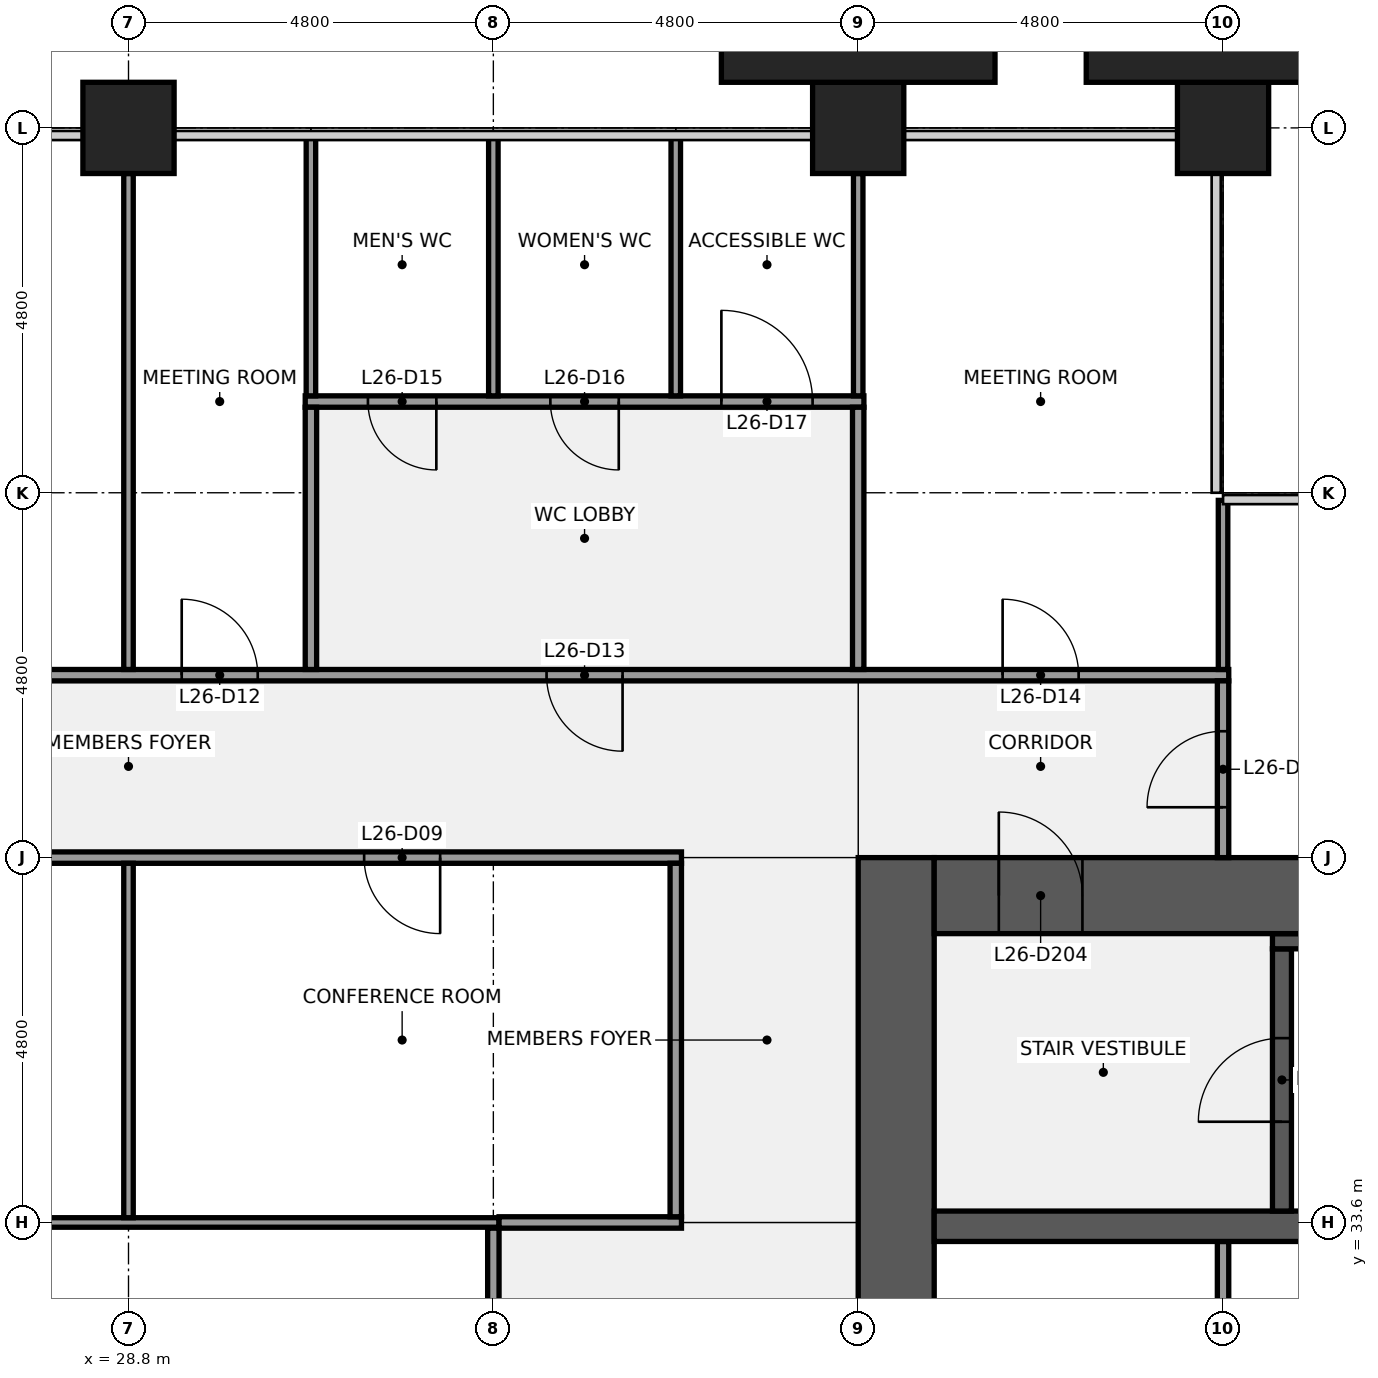
"""IFC4 building model, lengths in metres.
Left out: names, types, materials, properties, quantities, classifications, styles, units other than length and angle.
Written with IfcOpenShell. Run it as: python <this file> out.ifc"""

import sys

from ifc_helpers import new_model, si_unit, direction, frame, frame_2d, origin, origin_2d, place, context, subcontext, project, spatial, rectangle, extrude, element, fill, save


model = new_model("IFC4")
c1 = context("Model", 3, precision=1e-05, world=origin(), true_north=direction((0.0, 1.0)))
c2 = subcontext(c1, "Body", "Model", "MODEL_VIEW")
j1 = project(units=[si_unit("LENGTHUNIT", "METRE"), si_unit("PLANEANGLEUNIT", "RADIAN")], contexts=[c1])
p1 = place(None, origin())
s1 = spatial("IfcSite", under=j1, at=p1, CompositionType="ELEMENT")
p2 = place(p1, origin())
s2 = spatial("IfcBuilding", under=s1, at=p2, CompositionType="ELEMENT")
p3 = place(p2, frame((0.0, 0.0, 124.1)))
s3 = spatial("IfcBuildingStorey", under=s2, at=p3, CompositionType="ELEMENT", Elevation=124.1)
for number, where, z_axis, x_axis in (
    (1, (28.8, 48.0, 0.0), (0.0, 0.0, 1.0), (1.0, 0.0, 0.0)),
    (2, (38.4, 48.0, 0.0), (0.0, 0.0, 1.0), (1.0, 0.0, 0.0)),
    (3, (43.2, 48.0, 0.0), (0.0, 0.0, 1.0), (1.0, 0.0, 0.0)),
):
    element("IfcColumn", number, at=place(p3, frame(where, z_axis=z_axis, x_axis=x_axis)), inside=s3, PredefinedType="COLUMN", context=c2, shape_type="SweptSolid", body=[
        extrude(rectangle(XDim=1.2, YDim=1.2, at=origin_2d()), origin(), (0.0, 0.0, 1.0), 4.0),
    ])
p4 = place(p3, frame((38.9, 9.6, 0.0), z_axis=(0.0, 0.0, 1.0), x_axis=(0.0, 1.0, 0.0)))
e4 = element("IfcWall", 4, at=p4, inside=s3, PredefinedType="SHEAR", context=c2, shape_type="SweptSolid", body=[
    extrude(rectangle(XDim=28.8, YDim=1.0, at=frame_2d((14.4, 0.0))), origin(), (0.0, 0.0, 1.0), 3.84),
])
p5 = place(p4, frame((8.7, 0.0, 0.0)))
e5 = element("IfcOpeningElement", 5, at=p5, cuts=e4, PredefinedType="OPENING", context=c2, shape_type="SweptSolid", body=[
    extrude(rectangle(XDim=1.8, YDim=2.1, at=frame_2d((0.9, 1.05))), frame((0.0, 0.51, 0.0), z_axis=(0.0, -1.0, 0.0), x_axis=(1.0, 0.0, 0.0)), (0.0, 0.0, 1.0), 1.02),
])
p6 = place(p4, frame((18.3, 0.0, 0.0)))
e6 = element("IfcOpeningElement", 6, at=p6, cuts=e4, PredefinedType="OPENING", context=c2, shape_type="SweptSolid", body=[
    extrude(rectangle(XDim=1.8, YDim=2.1, at=frame_2d((0.9, 1.05))), frame((0.0, 0.51, 0.0), z_axis=(0.0, -1.0, 0.0), x_axis=(1.0, 0.0, 0.0)), (0.0, 0.0, 1.0), 1.02),
])
p7 = place(p3, frame((43.2, 30.75, 0.0), z_axis=(0.0, 0.0, 1.0), x_axis=(0.0, 1.0, 0.0)))
e7 = element("IfcWall", 7, at=p7, inside=s3, PredefinedType="PARTITIONING", context=c2, shape_type="SweptSolid", body=[
    extrude(rectangle(XDim=2.6, YDim=0.15, at=frame_2d((1.3, 0.0))), origin(), (0.0, 0.0, 1.0), 3.84),
])
p8 = place(p3, frame((39.4, 33.55, 0.0), z_axis=(0.0, 0.0, 1.0), x_axis=(1.0, 0.0, 0.0)))
e8 = element("IfcWall", 8, at=p8, inside=s3, PredefinedType="SHEAR", context=c2, shape_type="SweptSolid", body=[
    extrude(rectangle(XDim=17.2, YDim=0.4, at=frame_2d((8.6, 0.0))), origin(), (0.0, 0.0, 1.0), 3.84),
])
p9 = place(p3, frame((43.975, 33.75, 0.0), z_axis=(0.0, 0.0, 1.0), x_axis=(0.0, 1.0, 0.0)))
e9 = element("IfcWall", 9, at=p9, inside=s3, PredefinedType="SHEAR", context=c2, shape_type="SweptSolid", body=[
    extrude(rectangle(XDim=3.45, YDim=0.25, at=frame_2d((1.725, 0.0))), origin(), (0.0, 0.0, 1.0), 3.84),
])
p10 = place(p9, frame((1.175, 0.0, 0.0)))
e10 = element("IfcOpeningElement", 10, at=p10, cuts=e9, PredefinedType="OPENING", context=c2, shape_type="SweptSolid", body=[
    extrude(rectangle(XDim=1.1, YDim=2.1, at=frame_2d((0.55, 1.05))), frame((0.0, 0.135, 0.0), z_axis=(0.0, -1.0, 0.0), x_axis=(1.0, 0.0, 0.0)), (0.0, 0.0, 1.0), 0.27),
])
p11 = place(p3, frame((43.85, 37.3, 0.0), z_axis=(0.0, 0.0, 1.0), x_axis=(1.0, 0.0, 0.0)))
e11 = element("IfcWall", 11, at=p11, inside=s3, PredefinedType="SHEAR", context=c2, shape_type="SweptSolid", body=[
    extrude(rectangle(XDim=7.5, YDim=0.2, at=frame_2d((3.75, 0.0))), origin(), (0.0, 0.0, 1.0), 3.84),
])
p12 = place(p3, frame((39.4, 37.9, 0.0), z_axis=(0.0, 0.0, 1.0), x_axis=(1.0, 0.0, 0.0)))
e12 = element("IfcWall", 12, at=p12, inside=s3, PredefinedType="SHEAR", context=c2, shape_type="SweptSolid", body=[
    extrude(rectangle(XDim=13.4, YDim=1.0, at=frame_2d((6.7, 0.0))), origin(), (0.0, 0.0, 1.0), 3.84),
])
p13 = place(p12, frame((0.85, 0.0, 0.0)))
e13 = element("IfcOpeningElement", 13, at=p13, cuts=e12, PredefinedType="OPENING", context=c2, shape_type="SweptSolid", body=[
    extrude(rectangle(XDim=1.1, YDim=2.1, at=frame_2d((0.55, 1.05))), frame((0.0, 0.51, 0.0), z_axis=(0.0, -1.0, 0.0), x_axis=(1.0, 0.0, 0.0)), (0.0, 0.0, 1.0), 1.02),
])
p14 = place(p3, frame((24.075, 33.6, 0.0), z_axis=(0.0, 0.0, 1.0), x_axis=(1.0, 0.0, 0.0)))
e14 = element("IfcWall", 14, at=p14, inside=s3, PredefinedType="PARTITIONING", context=c2, shape_type="SweptSolid", body=[
    extrude(rectangle(XDim=9.6, YDim=0.125, at=frame_2d((4.8, 0.0))), origin(), (0.0, 0.0, 1.0), 2.849),
])
p15 = place(p3, frame((33.675, 33.6, 0.0), z_axis=(0.0, 0.0, 1.0), x_axis=(1.0, 0.0, 0.0)))
e15 = element("IfcWall", 15, at=p15, inside=s3, PredefinedType="PARTITIONING", context=c2, shape_type="SweptSolid", body=[
    extrude(rectangle(XDim=2.4, YDim=0.15, at=frame_2d((1.2, 0.0))), origin(), (0.0, 0.0, 1.0), 2.849),
])
p16 = place(p3, frame((21.525, 38.4, 0.0), z_axis=(0.0, 0.0, 1.0), x_axis=(1.0, 0.0, 0.0)))
e16 = element("IfcWall", 16, at=p16, inside=s3, PredefinedType="PARTITIONING", context=c2, shape_type="SweptSolid", body=[
    extrude(rectangle(XDim=14.55, YDim=0.15, at=frame_2d((7.275, 0.0))), origin(), (0.0, 0.0, 1.0), 2.849),
])
p17 = place(p16, frame((3.175, 0.0, 0.0)))
e17 = element("IfcOpeningElement", 17, at=p17, cuts=e16, PredefinedType="OPENING", context=c2, shape_type="SweptSolid", body=[
    extrude(rectangle(XDim=1.0, YDim=2.1, at=frame_2d((0.5, 1.05))), frame((0.0, 0.085, 0.0), z_axis=(0.0, -1.0, 0.0), x_axis=(1.0, 0.0, 0.0)), (0.0, 0.0, 1.0), 0.17),
])
p18 = place(p16, frame((10.375, 0.0, 0.0)))
e18 = element("IfcOpeningElement", 18, at=p18, cuts=e16, PredefinedType="OPENING", context=c2, shape_type="SweptSolid", body=[
    extrude(rectangle(XDim=1.0, YDim=2.1, at=frame_2d((0.5, 1.05))), frame((0.0, 0.085, 0.0), z_axis=(0.0, -1.0, 0.0), x_axis=(1.0, 0.0, 0.0)), (0.0, 0.0, 1.0), 0.17),
])
p19 = place(p3, frame((14.325, 40.8, 0.0), z_axis=(0.0, 0.0, 1.0), x_axis=(1.0, 0.0, 0.0)))
e19 = element("IfcWall", 19, at=p19, inside=s3, PredefinedType="PARTITIONING", context=c2, shape_type="SweptSolid", body=[
    extrude(rectangle(XDim=28.95, YDim=0.15, at=frame_2d((14.475, 0.0))), origin(), (0.0, 0.0, 1.0), 2.849),
])
p20 = place(p19, frame((1.975, 0.0, 0.0)))
e20 = element("IfcOpeningElement", 20, at=p20, cuts=e19, PredefinedType="OPENING", context=c2, shape_type="SweptSolid", body=[
    extrude(rectangle(XDim=1.0, YDim=2.1, at=frame_2d((0.5, 1.05))), frame((0.0, 0.085, 0.0), z_axis=(0.0, -1.0, 0.0), x_axis=(1.0, 0.0, 0.0)), (0.0, 0.0, 1.0), 0.17),
])
p21 = place(p19, frame((9.175, 0.0, 0.0)))
e21 = element("IfcOpeningElement", 21, at=p21, cuts=e19, PredefinedType="OPENING", context=c2, shape_type="SweptSolid", body=[
    extrude(rectangle(XDim=1.0, YDim=2.1, at=frame_2d((0.5, 1.05))), frame((0.0, 0.085, 0.0), z_axis=(0.0, -1.0, 0.0), x_axis=(1.0, 0.0, 0.0)), (0.0, 0.0, 1.0), 0.17),
])
p22 = place(p19, frame((15.175, 0.0, 0.0)))
e22 = element("IfcOpeningElement", 22, at=p22, cuts=e19, PredefinedType="OPENING", context=c2, shape_type="SweptSolid", body=[
    extrude(rectangle(XDim=1.0, YDim=2.1, at=frame_2d((0.5, 1.05))), frame((0.0, 0.085, 0.0), z_axis=(0.0, -1.0, 0.0), x_axis=(1.0, 0.0, 0.0)), (0.0, 0.0, 1.0), 0.17),
])
p23 = place(p19, frame((19.975, 0.0, 0.0)))
e23 = element("IfcOpeningElement", 23, at=p23, cuts=e19, PredefinedType="OPENING", context=c2, shape_type="SweptSolid", body=[
    extrude(rectangle(XDim=1.0, YDim=2.1, at=frame_2d((0.5, 1.05))), frame((0.0, 0.085, 0.0), z_axis=(0.0, -1.0, 0.0), x_axis=(1.0, 0.0, 0.0)), (0.0, 0.0, 1.0), 0.17),
])
p24 = place(p19, frame((25.975, 0.0, 0.0)))
e24 = element("IfcOpeningElement", 24, at=p24, cuts=e19, PredefinedType="OPENING", context=c2, shape_type="SweptSolid", body=[
    extrude(rectangle(XDim=1.0, YDim=2.1, at=frame_2d((0.5, 1.05))), frame((0.0, 0.085, 0.0), z_axis=(0.0, -1.0, 0.0), x_axis=(1.0, 0.0, 0.0)), (0.0, 0.0, 1.0), 0.17),
])
p25 = place(p3, frame((31.125, 44.4, 0.0), z_axis=(0.0, 0.0, 1.0), x_axis=(1.0, 0.0, 0.0)))
e25 = element("IfcWall", 25, at=p25, inside=s3, PredefinedType="PARTITIONING", context=c2, shape_type="SweptSolid", body=[
    extrude(rectangle(XDim=7.35, YDim=0.15, at=frame_2d((3.675, 0.0))), origin(), (0.0, 0.0, 1.0), 2.849),
])
p26 = place(p25, frame((0.825, 0.0, 0.0)))
e26 = element("IfcOpeningElement", 26, at=p26, cuts=e25, PredefinedType="OPENING", context=c2, shape_type="SweptSolid", body=[
    extrude(rectangle(XDim=0.9, YDim=2.1, at=frame_2d((0.45, 1.05))), frame((0.0, 0.085, 0.0), z_axis=(0.0, -1.0, 0.0), x_axis=(1.0, 0.0, 0.0)), (0.0, 0.0, 1.0), 0.17),
])
p27 = place(p25, frame((3.225, 0.0, 0.0)))
e27 = element("IfcOpeningElement", 27, at=p27, cuts=e25, PredefinedType="OPENING", context=c2, shape_type="SweptSolid", body=[
    extrude(rectangle(XDim=0.9, YDim=2.1, at=frame_2d((0.45, 1.05))), frame((0.0, 0.085, 0.0), z_axis=(0.0, -1.0, 0.0), x_axis=(1.0, 0.0, 0.0)), (0.0, 0.0, 1.0), 0.17),
])
p28 = place(p25, frame((5.475, 0.0, 0.0)))
e28 = element("IfcOpeningElement", 28, at=p28, cuts=e25, PredefinedType="OPENING", context=c2, shape_type="SweptSolid", body=[
    extrude(rectangle(XDim=1.2, YDim=2.1, at=frame_2d((0.6, 1.05))), frame((0.0, 0.085, 0.0), z_axis=(0.0, -1.0, 0.0), x_axis=(1.0, 0.0, 0.0)), (0.0, 0.0, 1.0), 0.17),
])
p29 = place(p3, frame((28.8, 33.663, 0.0), z_axis=(0.0, 0.0, 1.0), x_axis=(0.0, 1.0, 0.0)))
e29 = element("IfcWall", 29, at=p29, inside=s3, PredefinedType="PARTITIONING", context=c2, shape_type="SweptSolid", body=[
    extrude(rectangle(XDim=4.662, YDim=0.125, at=frame_2d((2.331, 0.0))), origin(), (0.0, 0.0, 1.0), 2.849),
])
p30 = place(p3, frame((28.8, 40.875, 0.0), z_axis=(0.0, 0.0, 1.0), x_axis=(0.0, 1.0, 0.0)))
e30 = element("IfcWall", 30, at=p30, inside=s3, PredefinedType="PARTITIONING", context=c2, shape_type="SweptSolid", body=[
    extrude(rectangle(XDim=6.525, YDim=0.125, at=frame_2d((3.262, 0.0))), origin(), (0.0, 0.0, 1.0), 2.849),
])
p31 = place(p3, frame((31.2, 44.475, 0.0), z_axis=(0.0, 0.0, 1.0), x_axis=(0.0, 1.0, 0.0)))
e31 = element("IfcWall", 31, at=p31, inside=s3, PredefinedType="PARTITIONING", context=c2, shape_type="SweptSolid", body=[
    extrude(rectangle(XDim=3.425, YDim=0.125, at=frame_2d((1.712, 0.0))), origin(), (0.0, 0.0, 1.0), 2.849),
])
p32 = place(p3, frame((31.2, 40.875, 0.0), z_axis=(0.0, 0.0, 1.0), x_axis=(0.0, 1.0, 0.0)))
e32 = element("IfcWall", 32, at=p32, inside=s3, PredefinedType="PARTITIONING", context=c2, shape_type="SweptSolid", body=[
    extrude(rectangle(XDim=3.45, YDim=0.15, at=frame_2d((1.725, 0.0))), origin(), (0.0, 0.0, 1.0), 2.849),
])
p33 = place(p3, frame((33.6, 44.475, 0.0), z_axis=(0.0, 0.0, 1.0), x_axis=(0.0, 1.0, 0.0)))
e33 = element("IfcWall", 33, at=p33, inside=s3, PredefinedType="PARTITIONING", context=c2, shape_type="SweptSolid", body=[
    extrude(rectangle(XDim=3.425, YDim=0.125, at=frame_2d((1.712, 0.0))), origin(), (0.0, 0.0, 1.0), 2.849),
])
p34 = place(p3, frame((33.6, 26.475, 0.0), z_axis=(0.0, 0.0, 1.0), x_axis=(0.0, 1.0, 0.0)))
e34 = element("IfcWall", 34, at=p34, inside=s3, PredefinedType="PARTITIONING", context=c2, shape_type="SweptSolid", body=[
    extrude(rectangle(XDim=7.05, YDim=0.15, at=frame_2d((3.525, 0.0))), origin(), (0.0, 0.0, 1.0), 2.849),
])
p35 = place(p3, frame((36.0, 44.475, 0.0), z_axis=(0.0, 0.0, 1.0), x_axis=(0.0, 1.0, 0.0)))
e35 = element("IfcWall", 35, at=p35, inside=s3, PredefinedType="PARTITIONING", context=c2, shape_type="SweptSolid", body=[
    extrude(rectangle(XDim=3.425, YDim=0.125, at=frame_2d((1.712, 0.0))), origin(), (0.0, 0.0, 1.0), 2.849),
])
p36 = place(p3, frame((36.0, 33.675, 0.0), z_axis=(0.0, 0.0, 1.0), x_axis=(0.0, 1.0, 0.0)))
e36 = element("IfcWall", 36, at=p36, inside=s3, PredefinedType="PARTITIONING", context=c2, shape_type="SweptSolid", body=[
    extrude(rectangle(XDim=4.65, YDim=0.15, at=frame_2d((2.325, 0.0))), origin(), (0.0, 0.0, 1.0), 2.849),
])
p37 = place(p3, frame((38.4, 44.475, 0.0), z_axis=(0.0, 0.0, 1.0), x_axis=(0.0, 1.0, 0.0)))
e37 = element("IfcWall", 37, at=p37, inside=s3, PredefinedType="PARTITIONING", context=c2, shape_type="SweptSolid", body=[
    extrude(rectangle(XDim=2.925, YDim=0.125, at=frame_2d((1.462, 0.0))), origin(), (0.0, 0.0, 1.0), 2.849),
])
p38 = place(p3, frame((38.4, 40.875, 0.0), z_axis=(0.0, 0.0, 1.0), x_axis=(0.0, 1.0, 0.0)))
e38 = element("IfcWall", 38, at=p38, inside=s3, PredefinedType="PARTITIONING", context=c2, shape_type="SweptSolid", body=[
    extrude(rectangle(XDim=3.45, YDim=0.15, at=frame_2d((1.725, 0.0))), origin(), (0.0, 0.0, 1.0), 2.849),
])
p39 = place(p3, frame((43.2, 40.875, 0.0), z_axis=(0.0, 0.0, 1.0), x_axis=(0.0, 1.0, 0.0)))
e39 = element("IfcWall", 39, at=p39, inside=s3, PredefinedType="PARTITIONING", context=c2, shape_type="SweptSolid", body=[
    extrude(rectangle(XDim=2.225, YDim=0.125, at=frame_2d((1.113, 0.0))), origin(), (0.0, 0.0, 1.0), 2.849),
])
p40 = place(p3, frame((43.2, 38.4, 0.0), z_axis=(0.0, 0.0, 1.0), x_axis=(0.0, 1.0, 0.0)))
e40 = element("IfcWall", 40, at=p40, inside=s3, PredefinedType="PARTITIONING", context=c2, shape_type="SweptSolid", body=[
    extrude(rectangle(XDim=2.325, YDim=0.15, at=frame_2d((1.163, 0.0))), origin(), (0.0, 0.0, 1.0), 2.849),
])
p41 = place(p40, frame((0.663, 0.0, 0.0)))
e41 = element("IfcOpeningElement", 41, at=p41, cuts=e40, PredefinedType="OPENING", context=c2, shape_type="SweptSolid", body=[
    extrude(rectangle(XDim=1.0, YDim=2.1, at=frame_2d((0.5, 1.05))), frame((0.0, 0.085, 0.0), z_axis=(0.0, -1.0, 0.0), x_axis=(1.0, 0.0, 0.0)), (0.0, 0.0, 1.0), 0.17),
])
for number, where, z_axis, x_axis in (
    (42, (38.4, 49.05, 0.0), (0.0, 0.0, 1.0), (1.0, 0.0, 0.0)),
    (43, (43.2, 49.05, 0.0), (0.0, 0.0, 1.0), (1.0, 0.0, 0.0)),
):
    element("IfcColumn", number, at=place(p3, frame(where, z_axis=z_axis, x_axis=x_axis)), inside=s3, PredefinedType="PILASTER", context=c2, shape_type="SweptSolid", body=[
        extrude(rectangle(XDim=3.6, YDim=0.9, at=origin_2d()), origin(), (0.0, 0.0, 1.0), 4.0),
    ])
p42 = place(p10, origin())
e44 = element("IfcDoor", 44, at=p42, inside=s3, OperationType="SINGLE_SWING_LEFT", PredefinedType="DOOR", context=c2, shape_type="SweptSolid", body=[
    extrude(rectangle(XDim=1.1, YDim=2.1, at=frame_2d((0.55, 1.05))), frame((0.0, 0.025, 0.0), z_axis=(0.0, -1.0, 0.0), x_axis=(1.0, 0.0, 0.0)), (0.0, 0.0, 1.0), 0.05),
])
fill(e10, e44)
p43 = place(p13, origin())
e45 = element("IfcDoor", 45, at=p43, inside=s3, OperationType="SINGLE_SWING_LEFT", PredefinedType="DOOR", context=c2, shape_type="SweptSolid", body=[
    extrude(rectangle(XDim=1.1, YDim=2.1, at=frame_2d((0.55, 1.05))), frame((0.0, 0.025, 0.0), z_axis=(0.0, -1.0, 0.0), x_axis=(1.0, 0.0, 0.0)), (0.0, 0.0, 1.0), 0.05),
])
fill(e13, e45)
p44 = place(p18, origin())
e46 = element("IfcDoor", 46, at=p44, inside=s3, OperationType="SINGLE_SWING_RIGHT", PredefinedType="DOOR", context=c2, shape_type="SweptSolid", body=[
    extrude(rectangle(XDim=1.0, YDim=2.1, at=frame_2d((0.5, 1.05))), frame((0.0, 0.025, 0.0), z_axis=(0.0, -1.0, 0.0), x_axis=(1.0, 0.0, 0.0)), (0.0, 0.0, 1.0), 0.05),
])
fill(e18, e46)
p45 = place(p22, origin())
e47 = element("IfcDoor", 47, at=p45, inside=s3, OperationType="SINGLE_SWING_LEFT", PredefinedType="DOOR", context=c2, shape_type="SweptSolid", body=[
    extrude(rectangle(XDim=1.0, YDim=2.1, at=frame_2d((0.5, 1.05))), frame((0.0, 0.025, 0.0), z_axis=(0.0, -1.0, 0.0), x_axis=(1.0, 0.0, 0.0)), (0.0, 0.0, 1.0), 0.05),
])
fill(e22, e47)
p46 = place(p23, origin())
e48 = element("IfcDoor", 48, at=p46, inside=s3, OperationType="SINGLE_SWING_RIGHT", PredefinedType="DOOR", context=c2, shape_type="SweptSolid", body=[
    extrude(rectangle(XDim=1.0, YDim=2.1, at=frame_2d((0.5, 1.05))), frame((0.0, 0.025, 0.0), z_axis=(0.0, -1.0, 0.0), x_axis=(1.0, 0.0, 0.0)), (0.0, 0.0, 1.0), 0.05),
])
fill(e23, e48)
p47 = place(p24, origin())
e49 = element("IfcDoor", 49, at=p47, inside=s3, OperationType="SINGLE_SWING_LEFT", PredefinedType="DOOR", context=c2, shape_type="SweptSolid", body=[
    extrude(rectangle(XDim=1.0, YDim=2.1, at=frame_2d((0.5, 1.05))), frame((0.0, 0.025, 0.0), z_axis=(0.0, -1.0, 0.0), x_axis=(1.0, 0.0, 0.0)), (0.0, 0.0, 1.0), 0.05),
])
fill(e24, e49)
p48 = place(p26, origin())
e50 = element("IfcDoor", 50, at=p48, inside=s3, OperationType="SINGLE_SWING_RIGHT", PredefinedType="DOOR", context=c2, shape_type="SweptSolid", body=[
    extrude(rectangle(XDim=0.9, YDim=2.1, at=frame_2d((0.45, 1.05))), frame((0.0, 0.025, 0.0), z_axis=(0.0, -1.0, 0.0), x_axis=(1.0, 0.0, 0.0)), (0.0, 0.0, 1.0), 0.05),
])
fill(e26, e50)
p49 = place(p27, origin())
e51 = element("IfcDoor", 51, at=p49, inside=s3, OperationType="SINGLE_SWING_RIGHT", PredefinedType="DOOR", context=c2, shape_type="SweptSolid", body=[
    extrude(rectangle(XDim=0.9, YDim=2.1, at=frame_2d((0.45, 1.05))), frame((0.0, 0.025, 0.0), z_axis=(0.0, -1.0, 0.0), x_axis=(1.0, 0.0, 0.0)), (0.0, 0.0, 1.0), 0.05),
])
fill(e27, e51)
p50 = place(p28, origin())
e52 = element("IfcDoor", 52, at=p50, inside=s3, OperationType="SINGLE_SWING_LEFT", PredefinedType="DOOR", context=c2, shape_type="SweptSolid", body=[
    extrude(rectangle(XDim=1.2, YDim=2.1, at=frame_2d((0.6, 1.05))), frame((0.0, 0.025, 0.0), z_axis=(0.0, -1.0, 0.0), x_axis=(1.0, 0.0, 0.0)), (0.0, 0.0, 1.0), 0.05),
])
fill(e28, e52)
p51 = place(p41, origin())
e53 = element("IfcDoor", 53, at=p51, inside=s3, OperationType="SINGLE_SWING_LEFT", PredefinedType="DOOR", context=c2, shape_type="SweptSolid", body=[
    extrude(rectangle(XDim=1.0, YDim=2.1, at=frame_2d((0.5, 1.05))), frame((0.0, 0.025, 0.0), z_axis=(0.0, -1.0, 0.0), x_axis=(1.0, 0.0, 0.0)), (0.0, 0.0, 1.0), 0.05),
])
fill(e41, e53)
save(model, sys.argv[1])
